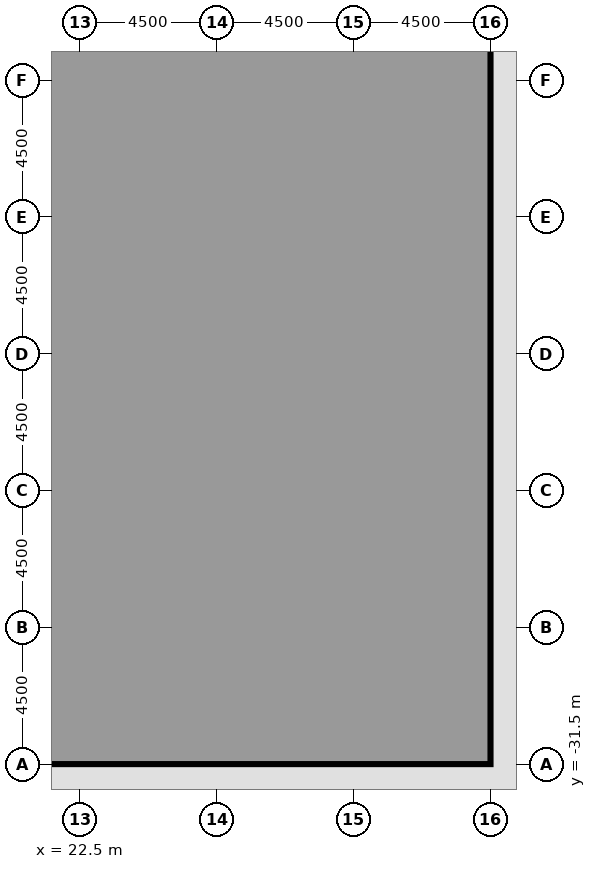
"""IFC4 building model, lengths in metres.
Left out: names, types, materials, properties, quantities, classifications, styles, units other than length and angle.
Written with IfcOpenShell. Run it as: python <this file> out.ifc"""

import sys

from ifc_helpers import new_model, si_unit, direction, frame, frame_2d, origin, origin_2d, place, context, subcontext, project, spatial, rectangle, extrude, element, fill, save


model = new_model("IFC4")
c1 = context("Model", 3, precision=1e-05, world=origin(), true_north=direction((0.0, 1.0)))
c2 = subcontext(c1, "Body", "Model", "MODEL_VIEW")
j1 = project(units=[si_unit("LENGTHUNIT", "METRE"), si_unit("PLANEANGLEUNIT", "RADIAN")], contexts=[c1])
p1 = place(None, origin())
s1 = spatial("IfcSite", under=j1, at=p1, CompositionType="ELEMENT")
p2 = place(p1, origin())
s2 = spatial("IfcBuilding", under=s1, at=p2, CompositionType="ELEMENT")
p3 = place(p2, origin())
s3 = spatial("IfcBuildingStorey", under=s2, at=p3, CompositionType="ELEMENT", Elevation=0.0)
for number, where, z_axis, x_axis in (
    (1, (22.5, -31.5, 0.0), (0.0, 0.0, 1.0), (1.0, 0.0, 0.0)),
    (2, (27.0, -31.5, 0.0), (0.0, 0.0, 1.0), (1.0, 0.0, 0.0)),
    (3, (31.5, -31.5, 0.0), (0.0, 0.0, 1.0), (1.0, 0.0, 0.0)),
    (4, (36.0, -27.0, 0.0), (0.0, 0.0, 1.0), (1.0, 0.0, 0.0)),
    (5, (36.0, -22.5, 0.0), (0.0, 0.0, 1.0), (1.0, 0.0, 0.0)),
    (6, (36.0, -18.0, 0.0), (0.0, 0.0, 1.0), (1.0, 0.0, 0.0)),
    (7, (36.0, -13.5, 0.0), (0.0, 0.0, 1.0), (1.0, 0.0, 0.0)),
    (8, (36.0, -9.0, 0.0), (0.0, 0.0, 1.0), (1.0, 0.0, 0.0)),
):
    element("IfcColumn", number, at=place(p3, frame(where, z_axis=z_axis, x_axis=x_axis)), inside=s3, PredefinedType="COLUMN", context=c2, shape_type="SweptSolid", body=[
        extrude(rectangle(XDim=1.4, YDim=1.4, at=origin_2d()), origin(), (0.0, 0.0, 1.0), 7.2),
    ])
p4 = place(p3, frame((22.5, -27.0, 0.0), z_axis=(0.0, 0.0, 1.0), x_axis=(1.0, 0.0, 0.0)))
e9 = element("IfcColumn", 9, at=p4, inside=s3, PredefinedType="COLUMN", context=c2, shape_type="SweptSolid", body=[
    extrude(rectangle(XDim=1.6, YDim=1.6, at=origin_2d()), origin(), (0.0, 0.0, 1.0), 6.75),
])
for number, where, z_axis, x_axis in (
    (10, (22.5, -18.0, 0.0), (0.0, 0.0, 1.0), (1.0, 0.0, 0.0)),
    (11, (22.5, -9.0, 0.0), (0.0, 0.0, 1.0), (1.0, 0.0, 0.0)),
):
    element("IfcColumn", number, at=place(p3, frame(where, z_axis=z_axis, x_axis=x_axis)), inside=s3, PredefinedType="COLUMN", context=c2, shape_type="SweptSolid", body=[
        extrude(rectangle(XDim=1.6, YDim=1.6, at=origin_2d()), origin(), (0.0, 0.0, 1.0), 7.2),
    ])
p5 = place(p3, frame((27.0, -27.0, 0.0), z_axis=(0.0, 0.0, 1.0), x_axis=(1.0, 0.0, 0.0)))
e12 = element("IfcColumn", 12, at=p5, inside=s3, PredefinedType="COLUMN", context=c2, shape_type="SweptSolid", body=[
    extrude(rectangle(XDim=1.6, YDim=1.6, at=origin_2d()), origin(), (0.0, 0.0, 1.0), 4.95),
])
for number, where, z_axis, x_axis in (
    (13, (27.0, -18.0, 0.0), (0.0, 0.0, 1.0), (1.0, 0.0, 0.0)),
    (14, (27.0, -9.0, 0.0), (0.0, 0.0, 1.0), (1.0, 0.0, 0.0)),
):
    element("IfcColumn", number, at=place(p3, frame(where, z_axis=z_axis, x_axis=x_axis)), inside=s3, PredefinedType="COLUMN", context=c2, shape_type="SweptSolid", body=[
        extrude(rectangle(XDim=1.6, YDim=1.6, at=origin_2d()), origin(), (0.0, 0.0, 1.0), 6.75),
    ])
p6 = place(p3, frame((30.8, -31.5, 0.0), z_axis=(0.0, 0.0, 1.0), x_axis=(-1.0, 0.0, 0.0)))
e15 = element("IfcWall", 15, at=p6, inside=s3, PredefinedType="SOLIDWALL", context=c2, shape_type="SweptSolid", body=[
    extrude(rectangle(XDim=3.1, YDim=0.35, at=frame_2d((1.55, 0.0))), origin(), (0.0, 0.0, 1.0), 5.85),
])
p7 = place(p6, frame((0.95, 0.0, 0.0)))
e16 = element("IfcOpeningElement", 16, at=p7, cuts=e15, PredefinedType="OPENING", context=c2, shape_type="SweptSolid", body=[
    extrude(rectangle(XDim=1.2, YDim=2.2, at=frame_2d((0.6, 1.1))), frame((0.0, 0.185, 0.0), z_axis=(0.0, -1.0, 0.0), x_axis=(1.0, 0.0, 0.0)), (0.0, 0.0, 1.0), 0.37),
])
p8 = place(p3, frame((35.424, -27.576, 0.0), z_axis=(0.0, 0.0, 1.0), x_axis=(-0.707106781187, -0.707106781187, 0.0)))
e17 = element("IfcWall", 17, at=p8, inside=s3, PredefinedType="SOLIDWALL", context=c2, shape_type="SweptSolid", body=[
    extrude(rectangle(XDim=4.734, YDim=0.35, at=frame_2d((2.367, 0.0))), origin(), (0.0, 0.0, 1.0), 5.85),
])
for number, where, z_axis, x_axis in (
    (18, (36.0, -23.2, 0.0), (0.0, 0.0, 1.0), (0.0, -1.0, 0.0)),
    (19, (36.0, -18.7, 0.0), (0.0, 0.0, 1.0), (0.0, -1.0, 0.0)),
):
    element("IfcWall", number, at=place(p3, frame(where, z_axis=z_axis, x_axis=x_axis)), inside=s3, PredefinedType="SOLIDWALL", context=c2, shape_type="SweptSolid", body=[
        extrude(rectangle(XDim=3.1, YDim=0.35, at=frame_2d((1.55, 0.0))), origin(), (0.0, 0.0, 1.0), 5.85),
    ])
p9 = place(p3, frame((36.0, -14.2, 0.0), z_axis=(0.0, 0.0, 1.0), x_axis=(0.0, -1.0, 0.0)))
e20 = element("IfcWall", 20, at=p9, inside=s3, PredefinedType="SOLIDWALL", context=c2, shape_type="SweptSolid", body=[
    extrude(rectangle(XDim=3.1, YDim=0.35, at=frame_2d((1.55, 0.0))), origin(), (0.0, 0.0, 1.0), 5.85),
])
p10 = place(p9, frame((0.95, 0.0, 0.0)))
e21 = element("IfcOpeningElement", 21, at=p10, cuts=e20, PredefinedType="OPENING", context=c2, shape_type="SweptSolid", body=[
    extrude(rectangle(XDim=1.2, YDim=2.2, at=frame_2d((0.6, 1.1))), frame((0.0, 0.185, 0.0), z_axis=(0.0, -1.0, 0.0), x_axis=(1.0, 0.0, 0.0)), (0.0, 0.0, 1.0), 0.37),
])
p11 = place(p3, frame((36.0, -9.7, 0.0), z_axis=(0.0, 0.0, 1.0), x_axis=(0.0, -1.0, 0.0)))
e22 = element("IfcWall", 22, at=p11, inside=s3, PredefinedType="SOLIDWALL", context=c2, shape_type="SweptSolid", body=[
    extrude(rectangle(XDim=3.1, YDim=0.35, at=frame_2d((1.55, 0.0))), origin(), (0.0, 0.0, 1.0), 5.85),
])
p12 = place(p3, frame((36.0, -5.2, 0.0), z_axis=(0.0, 0.0, 1.0), x_axis=(0.0, -1.0, 0.0)))
e23 = element("IfcWall", 23, at=p12, inside=s3, PredefinedType="SOLIDWALL", context=c2, shape_type="SweptSolid", body=[
    extrude(rectangle(XDim=3.1, YDim=0.35, at=frame_2d((1.55, 0.0))), origin(), (0.0, 0.0, 1.0), 5.85),
])
p13 = place(p12, frame((1.1, 0.0, 0.0)))
e24 = element("IfcOpeningElement", 24, at=p13, cuts=e23, PredefinedType="OPENING", context=c2, shape_type="SweptSolid", body=[
    extrude(rectangle(XDim=1.8, YDim=2.1, at=frame_2d((0.9, 1.05))), frame((0.0, 0.185, 0.0), z_axis=(0.0, -1.0, 0.0), x_axis=(1.0, 0.0, 0.0)), (0.0, 0.0, 1.0), 0.37),
])
p14 = place(p3, frame((22.5, -30.75, 0.0), z_axis=(0.0, 0.0, 1.0), x_axis=(0.0, 1.0, 0.0)))
e25 = element("IfcWall", 25, at=p14, inside=s3, PredefinedType="PARTITIONING", context=c2, shape_type="SweptSolid", body=[
    extrude(rectangle(XDim=2.9, YDim=0.15, at=frame_2d((1.45, 0.0))), origin(), (0.0, 0.0, 1.0), 6.75),
])
p15 = place(p3, frame((22.5, -26.15, 0.0), z_axis=(0.0, 0.0, 1.0), x_axis=(0.0, 1.0, 0.0)))
e26 = element("IfcWall", 26, at=p15, inside=s3, PredefinedType="PARTITIONING", context=c2, shape_type="SweptSolid", body=[
    extrude(rectangle(XDim=7.3, YDim=0.15, at=frame_2d((3.65, 0.0))), origin(), (0.0, 0.0, 1.0), 6.75),
])
p16 = place(p15, frame((2.75, 0.0, 0.0)))
e27 = element("IfcOpeningElement", 27, at=p16, cuts=e26, PredefinedType="OPENING", context=c2, shape_type="SweptSolid", body=[
    extrude(rectangle(XDim=1.8, YDim=2.1, at=frame_2d((0.9, 1.05))), frame((0.0, 0.085, 0.0), z_axis=(0.0, -1.0, 0.0), x_axis=(1.0, 0.0, 0.0)), (0.0, 0.0, 1.0), 0.17),
])
p17 = place(p3, frame((22.5, -17.15, 0.0), z_axis=(0.0, 0.0, 1.0), x_axis=(0.0, 1.0, 0.0)))
e28 = element("IfcWall", 28, at=p17, inside=s3, PredefinedType="PARTITIONING", context=c2, shape_type="SweptSolid", body=[
    extrude(rectangle(XDim=7.3, YDim=0.15, at=frame_2d((3.65, 0.0))), origin(), (0.0, 0.0, 1.0), 6.75),
])
p18 = place(p3, frame((20.2, -9.0, 0.0), z_axis=(0.0, 0.0, 1.0), x_axis=(1.0, 0.0, 0.0)))
e29 = element("IfcWall", 29, at=p18, inside=s3, PredefinedType="PARTITIONING", context=c2, shape_type="SweptSolid", body=[
    extrude(rectangle(XDim=1.45, YDim=0.15, at=frame_2d((0.725, 0.0))), origin(), (0.0, 0.0, 1.0), 6.75),
])
p19 = place(p3, frame((27.85, -9.0, 0.0), z_axis=(0.0, 0.0, 1.0), x_axis=(1.0, 0.0, 0.0)))
e30 = element("IfcWall", 30, at=p19, inside=s3, PredefinedType="PARTITIONING", context=c2, shape_type="SweptSolid", body=[
    extrude(rectangle(XDim=7.4, YDim=0.15, at=frame_2d((3.7, 0.0))), origin(), (0.0, 0.0, 1.0), 6.75),
])
p20 = place(p3, frame((23.35, -9.0, 0.0), z_axis=(0.0, 0.0, 1.0), x_axis=(1.0, 0.0, 0.0)))
e31 = element("IfcWall", 31, at=p20, inside=s3, PredefinedType="PARTITIONING", context=c2, shape_type="SweptSolid", body=[
    extrude(rectangle(XDim=2.8, YDim=0.15, at=frame_2d((1.4, 0.0))), origin(), (0.0, 0.0, 1.0), 6.75),
])
p21 = place(p7, origin())
e32 = element("IfcDoor", 32, at=p21, inside=s3, OperationType="SINGLE_SWING_LEFT", PredefinedType="DOOR", context=c2, shape_type="SweptSolid", body=[
    extrude(rectangle(XDim=1.2, YDim=2.2, at=frame_2d((0.6, 1.1))), frame((0.0, 0.025, 0.0), z_axis=(0.0, -1.0, 0.0), x_axis=(1.0, 0.0, 0.0)), (0.0, 0.0, 1.0), 0.05),
])
fill(e16, e32)
p22 = place(p10, origin())
e33 = element("IfcDoor", 33, at=p22, inside=s3, OperationType="SINGLE_SWING_LEFT", PredefinedType="DOOR", context=c2, shape_type="SweptSolid", body=[
    extrude(rectangle(XDim=1.2, YDim=2.2, at=frame_2d((0.6, 1.1))), frame((0.0, 0.025, 0.0), z_axis=(0.0, -1.0, 0.0), x_axis=(1.0, 0.0, 0.0)), (0.0, 0.0, 1.0), 0.05),
])
fill(e21, e33)
p23 = place(p16, origin())
e34 = element("IfcDoor", 34, at=p23, inside=s3, OperationType="DOUBLE_DOOR_DOUBLE_SWING", PredefinedType="DOOR", context=c2, shape_type="SweptSolid", body=[
    extrude(rectangle(XDim=1.8, YDim=2.1, at=frame_2d((0.9, 1.05))), frame((0.0, 0.025, 0.0), z_axis=(0.0, -1.0, 0.0), x_axis=(1.0, 0.0, 0.0)), (0.0, 0.0, 1.0), 0.05),
])
fill(e27, e34)
p24 = place(p13, origin())
e35 = element("IfcDoor", 35, at=p24, inside=s3, OperationType="DOUBLE_DOOR_DOUBLE_SWING", PredefinedType="DOOR", context=c2, shape_type="SweptSolid", body=[
    extrude(rectangle(XDim=1.8, YDim=2.1, at=frame_2d((0.9, 1.05))), frame((0.0, 0.025, 0.0), z_axis=(0.0, -1.0, 0.0), x_axis=(1.0, 0.0, 0.0)), (0.0, 0.0, 1.0), 0.05),
])
fill(e24, e35)
save(model, sys.argv[1])
